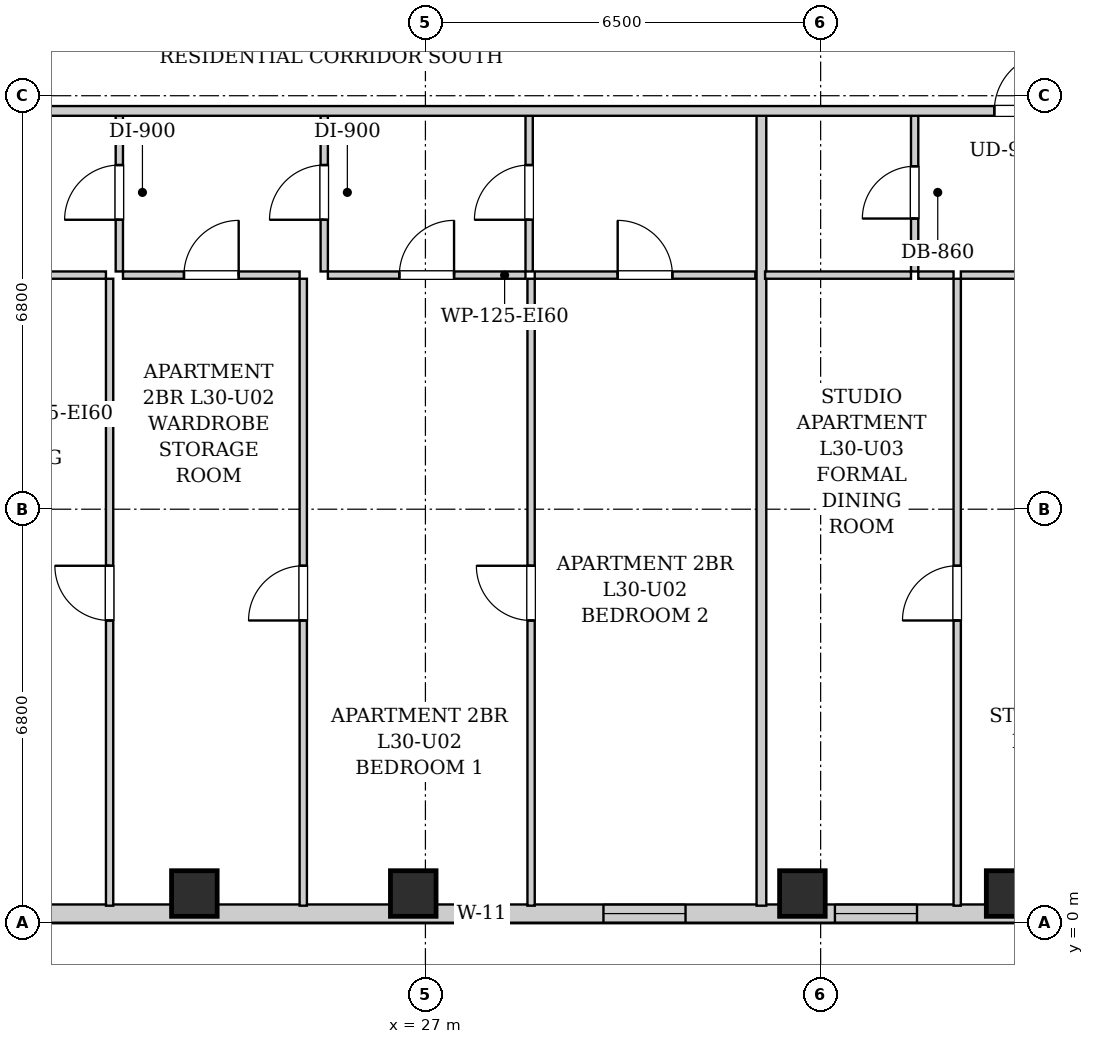
"""IFC4 building model, lengths in metres.
Left out: names, types, materials, properties, quantities, classifications, styles, units other than length and angle.
Written with IfcOpenShell. Run it as: python <this file> out.ifc"""

import sys

from ifc_helpers import new_model, si_unit, direction, frame, frame_2d, origin, origin_2d, place, context, subcontext, project, spatial, rectangle, extrude, element, fill, save


model = new_model("IFC4")
c1 = context("Model", 3, precision=1e-05, world=origin(), true_north=direction((0.0, 1.0)))
c2 = subcontext(c1, "Body", "Model", "MODEL_VIEW")
j1 = project(units=[si_unit("LENGTHUNIT", "METRE"), si_unit("PLANEANGLEUNIT", "RADIAN")], contexts=[c1])
p1 = place(None, origin())
s1 = spatial("IfcSite", under=j1, at=p1, CompositionType="ELEMENT")
p2 = place(p1, origin())
s2 = spatial("IfcBuilding", under=s1, at=p2, CompositionType="ELEMENT")
p3 = place(p2, frame((0.0, 0.0, 107.1)))
s3 = spatial("IfcBuildingStorey", under=s2, at=p3, CompositionType="ELEMENT", Elevation=107.1)
for number, where, z_axis, x_axis in (
    (1, (23.2, 0.48, 0.0), (0.0, 0.0, 1.0), (1.0, 0.0, 0.0)),
    (2, (26.8, 0.48, 0.0), (0.0, 0.0, 1.0), (1.0, 0.0, 0.0)),
    (3, (33.2, 0.48, 0.0), (0.0, 0.0, 1.0), (1.0, 0.0, 0.0)),
    (4, (36.6, 0.48, 0.0), (0.0, 0.0, 1.0), (1.0, 0.0, 0.0)),
):
    element("IfcColumn", number, at=place(p3, frame(where, z_axis=z_axis, x_axis=x_axis)), inside=s3, PredefinedType="COLUMN", context=c2, shape_type="SweptSolid", body=[
        extrude(rectangle(XDim=0.75, YDim=0.75, at=origin_2d()), origin(), (0.0, 0.0, 1.0), 3.2),
    ])
p4 = place(p3, frame((40.9, 0.15, 0.0), z_axis=(0.0, 0.0, 1.0), x_axis=(-1.0, 0.0, 0.0)))
e5 = element("IfcWall", 5, at=p4, inside=s3, PredefinedType="SOLIDWALL", context=c2, shape_type="SweptSolid", body=[
    extrude(rectangle(XDim=23.15, YDim=0.3, at=frame_2d((11.575, 0.0))), origin(), (0.0, 0.0, 1.0), 2.94),
])
p5 = place(p4, frame((20.296, 0.0, 0.55)))
e6 = element("IfcOpeningElement", 6, at=p5, cuts=e5, PredefinedType="OPENING", context=c2, shape_type="SweptSolid", body=[
    extrude(rectangle(XDim=1.35, YDim=1.2, at=frame_2d((0.675, 0.6))), frame((0.0, 0.16, 0.0), z_axis=(0.0, -1.0, 0.0), x_axis=(1.0, 0.0, 0.0)), (0.0, 0.0, 1.0), 0.32),
])
p6 = place(p4, frame((12.55, 0.0, 0.55)))
e7 = element("IfcOpeningElement", 7, at=p6, cuts=e5, PredefinedType="OPENING", context=c2, shape_type="SweptSolid", body=[
    extrude(rectangle(XDim=0.85, YDim=1.2, at=frame_2d((0.425, 0.6))), frame((0.0, 0.16, 0.0), z_axis=(0.0, -1.0, 0.0), x_axis=(1.0, 0.0, 0.0)), (0.0, 0.0, 1.0), 0.32),
])
p7 = place(p4, frame((9.622, 0.0, 0.55)))
e8 = element("IfcOpeningElement", 8, at=p7, cuts=e5, PredefinedType="OPENING", context=c2, shape_type="SweptSolid", body=[
    extrude(rectangle(XDim=1.35, YDim=1.2, at=frame_2d((0.675, 0.6))), frame((0.0, 0.16, 0.0), z_axis=(0.0, -1.0, 0.0), x_axis=(1.0, 0.0, 0.0)), (0.0, 0.0, 1.0), 0.32),
])
p8 = place(p4, frame((5.815, 0.0, 0.55)))
e9 = element("IfcOpeningElement", 9, at=p8, cuts=e5, PredefinedType="OPENING", context=c2, shape_type="SweptSolid", body=[
    extrude(rectangle(XDim=1.35, YDim=1.2, at=frame_2d((0.675, 0.6))), frame((0.0, 0.16, 0.0), z_axis=(0.0, -1.0, 0.0), x_axis=(1.0, 0.0, 0.0)), (0.0, 0.0, 1.0), 0.32),
])
p9 = place(p4, frame((2.106, 0.0, 0.55)))
e10 = element("IfcOpeningElement", 10, at=p9, cuts=e5, PredefinedType="OPENING", context=c2, shape_type="SweptSolid", body=[
    extrude(rectangle(XDim=1.35, YDim=1.2, at=frame_2d((0.675, 0.6))), frame((0.0, 0.16, 0.0), z_axis=(0.0, -1.0, 0.0), x_axis=(1.0, 0.0, 0.0)), (0.0, 0.0, 1.0), 0.32),
])
p10 = place(p3, frame((21.966, 10.71, 0.0), z_axis=(0.0, 0.0, 1.0), x_axis=(0.0, 1.0, 0.0)))
e11 = element("IfcWall", 11, at=p10, inside=s3, PredefinedType="PARTITIONING", context=c2, shape_type="SweptSolid", body=[
    extrude(rectangle(XDim=2.6, YDim=0.12, at=frame_2d((1.3, 0.0))), origin(), (0.0, 0.0, 1.0), 2.94),
])
p11 = place(p10, frame((0.85, 0.0, 0.0)))
e12 = element("IfcOpeningElement", 12, at=p11, cuts=e11, PredefinedType="OPENING", context=c2, shape_type="SweptSolid", body=[
    extrude(rectangle(XDim=0.9, YDim=2.05, at=frame_2d((0.45, 1.025))), frame((0.0, 0.07, 0.0), z_axis=(0.0, -1.0, 0.0), x_axis=(1.0, 0.0, 0.0)), (0.0, 0.0, 1.0), 0.14),
])
p12 = place(p3, frame((17.466, 10.65, 0.0), z_axis=(0.0, 0.0, 1.0), x_axis=(1.0, 0.0, 0.0)))
e13 = element("IfcWall", 13, at=p12, inside=s3, PredefinedType="PARTITIONING", context=c2, shape_type="SweptSolid", body=[
    extrude(rectangle(XDim=4.28, YDim=0.12, at=frame_2d((2.14, 0.0))), origin(), (0.0, 0.0, 1.0), 2.94),
])
p13 = place(p12, frame((1.69, 0.0, 0.0)))
e14 = element("IfcOpeningElement", 14, at=p13, cuts=e13, PredefinedType="OPENING", context=c2, shape_type="SweptSolid", body=[
    extrude(rectangle(XDim=0.9, YDim=2.05, at=frame_2d((0.45, 1.025))), frame((0.0, 0.07, 0.0), z_axis=(0.0, -1.0, 0.0), x_axis=(1.0, 0.0, 0.0)), (0.0, 0.0, 1.0), 0.14),
])
p14 = place(p3, frame((25.336, 10.71, 0.0), z_axis=(0.0, 0.0, 1.0), x_axis=(0.0, 1.0, 0.0)))
e15 = element("IfcWall", 15, at=p14, inside=s3, PredefinedType="PARTITIONING", context=c2, shape_type="SweptSolid", body=[
    extrude(rectangle(XDim=2.6, YDim=0.12, at=frame_2d((1.3, 0.0))), origin(), (0.0, 0.0, 1.0), 2.94),
])
p15 = place(p14, frame((0.85, 0.0, 0.0)))
e16 = element("IfcOpeningElement", 16, at=p15, cuts=e15, PredefinedType="OPENING", context=c2, shape_type="SweptSolid", body=[
    extrude(rectangle(XDim=0.9, YDim=2.05, at=frame_2d((0.45, 1.025))), frame((0.0, 0.07, 0.0), z_axis=(0.0, -1.0, 0.0), x_axis=(1.0, 0.0, 0.0)), (0.0, 0.0, 1.0), 0.14),
])
p16 = place(p3, frame((22.026, 10.65, 0.0), z_axis=(0.0, 0.0, 1.0), x_axis=(1.0, 0.0, 0.0)))
e17 = element("IfcWall", 17, at=p16, inside=s3, PredefinedType="PARTITIONING", context=c2, shape_type="SweptSolid", body=[
    extrude(rectangle(XDim=2.905, YDim=0.12, at=frame_2d((1.453, 0.0))), origin(), (0.0, 0.0, 1.0), 2.94),
])
p17 = place(p16, frame((1.003, 0.0, 0.0)))
e18 = element("IfcOpeningElement", 18, at=p17, cuts=e17, PredefinedType="OPENING", context=c2, shape_type="SweptSolid", body=[
    extrude(rectangle(XDim=0.9, YDim=2.05, at=frame_2d((0.45, 1.025))), frame((0.0, 0.07, 0.0), z_axis=(0.0, -1.0, 0.0), x_axis=(1.0, 0.0, 0.0)), (0.0, 0.0, 1.0), 0.14),
])
p18 = place(p3, frame((28.706, 10.71, 0.0), z_axis=(0.0, 0.0, 1.0), x_axis=(0.0, 1.0, 0.0)))
e19 = element("IfcWall", 19, at=p18, inside=s3, PredefinedType="PARTITIONING", context=c2, shape_type="SweptSolid", body=[
    extrude(rectangle(XDim=2.6, YDim=0.12, at=frame_2d((1.3, 0.0))), origin(), (0.0, 0.0, 1.0), 2.94),
])
p19 = place(p18, frame((0.85, 0.0, 0.0)))
e20 = element("IfcOpeningElement", 20, at=p19, cuts=e19, PredefinedType="OPENING", context=c2, shape_type="SweptSolid", body=[
    extrude(rectangle(XDim=0.9, YDim=2.05, at=frame_2d((0.45, 1.025))), frame((0.0, 0.07, 0.0), z_axis=(0.0, -1.0, 0.0), x_axis=(1.0, 0.0, 0.0)), (0.0, 0.0, 1.0), 0.14),
])
p20 = place(p3, frame((25.396, 10.65, 0.0), z_axis=(0.0, 0.0, 1.0), x_axis=(1.0, 0.0, 0.0)))
e21 = element("IfcWall", 21, at=p20, inside=s3, PredefinedType="PARTITIONING", context=c2, shape_type="SweptSolid", body=[
    extrude(rectangle(XDim=3.25, YDim=0.12, at=frame_2d((1.625, 0.0))), origin(), (0.0, 0.0, 1.0), 2.94),
])
p21 = place(p20, frame((1.175, 0.0, 0.0)))
e22 = element("IfcOpeningElement", 22, at=p21, cuts=e21, PredefinedType="OPENING", context=c2, shape_type="SweptSolid", body=[
    extrude(rectangle(XDim=0.9, YDim=2.05, at=frame_2d((0.45, 1.025))), frame((0.0, 0.07, 0.0), z_axis=(0.0, -1.0, 0.0), x_axis=(1.0, 0.0, 0.0)), (0.0, 0.0, 1.0), 0.14),
])
p22 = place(p3, frame((28.798, 10.65, 0.0), z_axis=(0.0, 0.0, 1.0), x_axis=(1.0, 0.0, 0.0)))
e23 = element("IfcWall", 23, at=p22, inside=s3, PredefinedType="PARTITIONING", context=c2, shape_type="SweptSolid", body=[
    extrude(rectangle(XDim=3.628, YDim=0.12, at=frame_2d((1.814, 0.0))), origin(), (0.0, 0.0, 1.0), 2.94),
])
p23 = place(p22, frame((1.364, 0.0, 0.0)))
e24 = element("IfcOpeningElement", 24, at=p23, cuts=e23, PredefinedType="OPENING", context=c2, shape_type="SweptSolid", body=[
    extrude(rectangle(XDim=0.9, YDim=2.05, at=frame_2d((0.45, 1.025))), frame((0.0, 0.07, 0.0), z_axis=(0.0, -1.0, 0.0), x_axis=(1.0, 0.0, 0.0)), (0.0, 0.0, 1.0), 0.14),
])
p24 = place(p3, frame((21.806, 0.28, 0.0), z_axis=(0.0, 0.0, 1.0), x_axis=(0.0, 1.0, 0.0)))
e25 = element("IfcWall", 25, at=p24, inside=s3, PredefinedType="PARTITIONING", context=c2, shape_type="SweptSolid", body=[
    extrude(rectangle(XDim=10.31, YDim=0.12, at=frame_2d((5.155, 0.0))), origin(), (0.0, 0.0, 1.0), 2.94),
])
p25 = place(p24, frame((4.69, 0.0, 0.0)))
e26 = element("IfcOpeningElement", 26, at=p25, cuts=e25, PredefinedType="OPENING", context=c2, shape_type="SweptSolid", body=[
    extrude(rectangle(XDim=0.9, YDim=2.05, at=frame_2d((0.45, 1.025))), frame((0.0, 0.07, 0.0), z_axis=(0.0, -1.0, 0.0), x_axis=(1.0, 0.0, 0.0)), (0.0, 0.0, 1.0), 0.14),
])
p26 = place(p3, frame((24.991, 0.28, 0.0), z_axis=(0.0, 0.0, 1.0), x_axis=(0.0, 1.0, 0.0)))
e27 = element("IfcWall", 27, at=p26, inside=s3, PredefinedType="PARTITIONING", context=c2, shape_type="SweptSolid", body=[
    extrude(rectangle(XDim=10.31, YDim=0.12, at=frame_2d((5.155, 0.0))), origin(), (0.0, 0.0, 1.0), 2.94),
])
p27 = place(p26, frame((4.69, 0.0, 0.0)))
e28 = element("IfcOpeningElement", 28, at=p27, cuts=e27, PredefinedType="OPENING", context=c2, shape_type="SweptSolid", body=[
    extrude(rectangle(XDim=0.9, YDim=2.05, at=frame_2d((0.45, 1.025))), frame((0.0, 0.07, 0.0), z_axis=(0.0, -1.0, 0.0), x_axis=(1.0, 0.0, 0.0)), (0.0, 0.0, 1.0), 0.14),
])
p28 = place(p3, frame((28.738, 0.28, 0.0), z_axis=(0.0, 0.0, 1.0), x_axis=(0.0, 1.0, 0.0)))
e29 = element("IfcWall", 29, at=p28, inside=s3, PredefinedType="PARTITIONING", context=c2, shape_type="SweptSolid", body=[
    extrude(rectangle(XDim=10.31, YDim=0.12, at=frame_2d((5.155, 0.0))), origin(), (0.0, 0.0, 1.0), 2.94),
])
p29 = place(p28, frame((4.69, 0.0, 0.0)))
e30 = element("IfcOpeningElement", 30, at=p29, cuts=e29, PredefinedType="OPENING", context=c2, shape_type="SweptSolid", body=[
    extrude(rectangle(XDim=0.9, YDim=2.05, at=frame_2d((0.45, 1.025))), frame((0.0, 0.07, 0.0), z_axis=(0.0, -1.0, 0.0), x_axis=(1.0, 0.0, 0.0)), (0.0, 0.0, 1.0), 0.14),
])
p30 = place(p3, frame((32.526, 0.28, 0.0), z_axis=(0.0, 0.0, 1.0), x_axis=(0.0, 1.0, 0.0)))
e31 = element("IfcWall", 31, at=p30, inside=s3, PredefinedType="PARTITIONING", context=c2, shape_type="SweptSolid", body=[
    extrude(rectangle(XDim=13.03, YDim=0.16, at=frame_2d((6.515, 0.0))), origin(), (0.0, 0.0, 1.0), 2.94),
])
p31 = place(p3, frame((35.046, 10.71, 0.0), z_axis=(0.0, 0.0, 1.0), x_axis=(0.0, 1.0, 0.0)))
e32 = element("IfcWall", 32, at=p31, inside=s3, PredefinedType="PARTITIONING", context=c2, shape_type="SweptSolid", body=[
    extrude(rectangle(XDim=2.6, YDim=0.12, at=frame_2d((1.3, 0.0))), origin(), (0.0, 0.0, 1.0), 2.94),
])
p32 = place(p31, frame((0.87, 0.0, 0.0)))
e33 = element("IfcOpeningElement", 33, at=p32, cuts=e32, PredefinedType="OPENING", context=c2, shape_type="SweptSolid", body=[
    extrude(rectangle(XDim=0.86, YDim=2.05, at=frame_2d((0.43, 1.025))), frame((0.0, 0.07, 0.0), z_axis=(0.0, -1.0, 0.0), x_axis=(1.0, 0.0, 0.0)), (0.0, 0.0, 1.0), 0.14),
])
p33 = place(p3, frame((32.586, 10.65, 0.0), z_axis=(0.0, 0.0, 1.0), x_axis=(1.0, 0.0, 0.0)))
e34 = element("IfcWall", 34, at=p33, inside=s3, PredefinedType="PARTITIONING", context=c2, shape_type="SweptSolid", body=[
    extrude(rectangle(XDim=2.4, YDim=0.12, at=frame_2d((1.2, 0.0))), origin(), (0.0, 0.0, 1.0), 2.94),
])
p34 = place(p3, frame((35.106, 10.65, 0.0), z_axis=(0.0, 0.0, 1.0), x_axis=(1.0, 0.0, 0.0)))
e35 = element("IfcWall", 35, at=p34, inside=s3, PredefinedType="PARTITIONING", context=c2, shape_type="SweptSolid", body=[
    extrude(rectangle(XDim=0.58, YDim=0.12, at=frame_2d((0.29, 0.0))), origin(), (0.0, 0.0, 1.0), 2.94),
])
p35 = place(p3, frame((35.806, 10.65, 0.0), z_axis=(0.0, 0.0, 1.0), x_axis=(1.0, 0.0, 0.0)))
e36 = element("IfcWall", 36, at=p35, inside=s3, PredefinedType="PARTITIONING", context=c2, shape_type="SweptSolid", body=[
    extrude(rectangle(XDim=2.75, YDim=0.12, at=frame_2d((1.375, 0.0))), origin(), (0.0, 0.0, 1.0), 2.94),
])
p36 = place(p35, frame((0.925, 0.0, 0.0)))
e37 = element("IfcOpeningElement", 37, at=p36, cuts=e36, PredefinedType="OPENING", context=c2, shape_type="SweptSolid", body=[
    extrude(rectangle(XDim=0.9, YDim=2.05, at=frame_2d((0.45, 1.025))), frame((0.0, 0.07, 0.0), z_axis=(0.0, -1.0, 0.0), x_axis=(1.0, 0.0, 0.0)), (0.0, 0.0, 1.0), 0.14),
])
p37 = place(p3, frame((35.746, 0.28, 0.0), z_axis=(0.0, 0.0, 1.0), x_axis=(0.0, 1.0, 0.0)))
e38 = element("IfcWall", 38, at=p37, inside=s3, PredefinedType="PARTITIONING", context=c2, shape_type="SweptSolid", body=[
    extrude(rectangle(XDim=10.31, YDim=0.12, at=frame_2d((5.155, 0.0))), origin(), (0.0, 0.0, 1.0), 2.94),
])
p38 = place(p37, frame((4.69, 0.0, 0.0)))
e39 = element("IfcOpeningElement", 39, at=p38, cuts=e38, PredefinedType="OPENING", context=c2, shape_type="SweptSolid", body=[
    extrude(rectangle(XDim=0.9, YDim=2.05, at=frame_2d((0.45, 1.025))), frame((0.0, 0.07, 0.0), z_axis=(0.0, -1.0, 0.0), x_axis=(1.0, 0.0, 0.0)), (0.0, 0.0, 1.0), 0.14),
])
p39 = place(p3, frame((10.05, 13.35, 0.0), z_axis=(0.0, 0.0, 1.0), x_axis=(1.0, 0.0, 0.0)))
e40 = element("IfcWall", 40, at=p39, inside=s3, PredefinedType="PARTITIONING", context=c2, shape_type="SweptSolid", body=[
    extrude(rectangle(XDim=30.8, YDim=0.16, at=frame_2d((15.4, 0.0))), origin(), (0.0, 0.0, 1.0), 2.94),
])
p40 = place(p39, frame((2.893, 0.0, 0.0)))
e41 = element("IfcOpeningElement", 41, at=p40, cuts=e40, PredefinedType="OPENING", context=c2, shape_type="SweptSolid", body=[
    extrude(rectangle(XDim=0.95, YDim=2.1, at=frame_2d((0.475, 1.05))), frame((0.0, 0.09, 0.0), z_axis=(0.0, -1.0, 0.0), x_axis=(1.0, 0.0, 0.0)), (0.0, 0.0, 1.0), 0.18),
])
p41 = place(p39, frame((9.161, 0.0, 0.0)))
e42 = element("IfcOpeningElement", 42, at=p41, cuts=e40, PredefinedType="OPENING", context=c2, shape_type="SweptSolid", body=[
    extrude(rectangle(XDim=0.95, YDim=2.1, at=frame_2d((0.475, 1.05))), frame((0.0, 0.09, 0.0), z_axis=(0.0, -1.0, 0.0), x_axis=(1.0, 0.0, 0.0)), (0.0, 0.0, 1.0), 0.18),
])
p42 = place(p39, frame((26.306, 0.0, 0.0)))
e43 = element("IfcOpeningElement", 43, at=p42, cuts=e40, PredefinedType="OPENING", context=c2, shape_type="SweptSolid", body=[
    extrude(rectangle(XDim=0.95, YDim=2.1, at=frame_2d((0.475, 1.05))), frame((0.0, 0.09, 0.0), z_axis=(0.0, -1.0, 0.0), x_axis=(1.0, 0.0, 0.0)), (0.0, 0.0, 1.0), 0.18),
])
p43 = place(p11, origin())
e44 = element("IfcDoor", 44, at=p43, inside=s3, OperationType="SINGLE_SWING_LEFT", PredefinedType="DOOR", context=c2, shape_type="SweptSolid", body=[
    extrude(rectangle(XDim=0.9, YDim=2.05, at=frame_2d((0.45, 1.025))), frame((0.0, 0.025, 0.0), z_axis=(0.0, -1.0, 0.0), x_axis=(1.0, 0.0, 0.0)), (0.0, 0.0, 1.0), 0.05),
])
fill(e12, e44)
p44 = place(p15, origin())
e45 = element("IfcDoor", 45, at=p44, inside=s3, OperationType="SINGLE_SWING_LEFT", PredefinedType="DOOR", context=c2, shape_type="SweptSolid", body=[
    extrude(rectangle(XDim=0.9, YDim=2.05, at=frame_2d((0.45, 1.025))), frame((0.0, 0.025, 0.0), z_axis=(0.0, -1.0, 0.0), x_axis=(1.0, 0.0, 0.0)), (0.0, 0.0, 1.0), 0.05),
])
fill(e16, e45)
p45 = place(p17, origin())
e46 = element("IfcDoor", 46, at=p45, inside=s3, OperationType="SINGLE_SWING_RIGHT", PredefinedType="DOOR", context=c2, shape_type="SweptSolid", body=[
    extrude(rectangle(XDim=0.9, YDim=2.05, at=frame_2d((0.45, 1.025))), frame((0.0, 0.025, 0.0), z_axis=(0.0, -1.0, 0.0), x_axis=(1.0, 0.0, 0.0)), (0.0, 0.0, 1.0), 0.05),
])
fill(e18, e46)
p46 = place(p19, origin())
e47 = element("IfcDoor", 47, at=p46, inside=s3, OperationType="SINGLE_SWING_LEFT", PredefinedType="DOOR", context=c2, shape_type="SweptSolid", body=[
    extrude(rectangle(XDim=0.9, YDim=2.05, at=frame_2d((0.45, 1.025))), frame((0.0, 0.025, 0.0), z_axis=(0.0, -1.0, 0.0), x_axis=(1.0, 0.0, 0.0)), (0.0, 0.0, 1.0), 0.05),
])
fill(e20, e47)
p47 = place(p21, origin())
e48 = element("IfcDoor", 48, at=p47, inside=s3, OperationType="SINGLE_SWING_RIGHT", PredefinedType="DOOR", context=c2, shape_type="SweptSolid", body=[
    extrude(rectangle(XDim=0.9, YDim=2.05, at=frame_2d((0.45, 1.025))), frame((0.0, 0.025, 0.0), z_axis=(0.0, -1.0, 0.0), x_axis=(1.0, 0.0, 0.0)), (0.0, 0.0, 1.0), 0.05),
])
fill(e22, e48)
p48 = place(p23, origin())
e49 = element("IfcDoor", 49, at=p48, inside=s3, OperationType="SINGLE_SWING_LEFT", PredefinedType="DOOR", context=c2, shape_type="SweptSolid", body=[
    extrude(rectangle(XDim=0.9, YDim=2.05, at=frame_2d((0.45, 1.025))), frame((0.0, 0.025, 0.0), z_axis=(0.0, -1.0, 0.0), x_axis=(1.0, 0.0, 0.0)), (0.0, 0.0, 1.0), 0.05),
])
fill(e24, e49)
p49 = place(p25, origin())
e50 = element("IfcDoor", 50, at=p49, inside=s3, OperationType="SINGLE_SWING_RIGHT", PredefinedType="DOOR", context=c2, shape_type="SweptSolid", body=[
    extrude(rectangle(XDim=0.9, YDim=2.05, at=frame_2d((0.45, 1.025))), frame((0.0, 0.025, 0.0), z_axis=(0.0, -1.0, 0.0), x_axis=(1.0, 0.0, 0.0)), (0.0, 0.0, 1.0), 0.05),
])
fill(e26, e50)
p50 = place(p27, origin())
e51 = element("IfcDoor", 51, at=p50, inside=s3, OperationType="SINGLE_SWING_LEFT", PredefinedType="DOOR", context=c2, shape_type="SweptSolid", body=[
    extrude(rectangle(XDim=0.9, YDim=2.05, at=frame_2d((0.45, 1.025))), frame((0.0, 0.025, 0.0), z_axis=(0.0, -1.0, 0.0), x_axis=(1.0, 0.0, 0.0)), (0.0, 0.0, 1.0), 0.05),
])
fill(e28, e51)
p51 = place(p29, origin())
e52 = element("IfcDoor", 52, at=p51, inside=s3, OperationType="SINGLE_SWING_RIGHT", PredefinedType="DOOR", context=c2, shape_type="SweptSolid", body=[
    extrude(rectangle(XDim=0.9, YDim=2.05, at=frame_2d((0.45, 1.025))), frame((0.0, 0.025, 0.0), z_axis=(0.0, -1.0, 0.0), x_axis=(1.0, 0.0, 0.0)), (0.0, 0.0, 1.0), 0.05),
])
fill(e30, e52)
p52 = place(p32, origin())
e53 = element("IfcDoor", 53, at=p52, inside=s3, OperationType="SINGLE_SWING_LEFT", PredefinedType="DOOR", context=c2, shape_type="SweptSolid", body=[
    extrude(rectangle(XDim=0.86, YDim=2.05, at=frame_2d((0.43, 1.025))), frame((0.0, 0.025, 0.0), z_axis=(0.0, -1.0, 0.0), x_axis=(1.0, 0.0, 0.0)), (0.0, 0.0, 1.0), 0.05),
])
fill(e33, e53)
p53 = place(p38, origin())
e54 = element("IfcDoor", 54, at=p53, inside=s3, OperationType="SINGLE_SWING_LEFT", PredefinedType="DOOR", context=c2, shape_type="SweptSolid", body=[
    extrude(rectangle(XDim=0.9, YDim=2.05, at=frame_2d((0.45, 1.025))), frame((0.0, 0.025, 0.0), z_axis=(0.0, -1.0, 0.0), x_axis=(1.0, 0.0, 0.0)), (0.0, 0.0, 1.0), 0.05),
])
fill(e39, e54)
p54 = place(p42, origin())
e55 = element("IfcDoor", 55, at=p54, inside=s3, OperationType="SINGLE_SWING_RIGHT", PredefinedType="DOOR", context=c2, shape_type="SweptSolid", body=[
    extrude(rectangle(XDim=0.95, YDim=2.1, at=frame_2d((0.475, 1.05))), frame((0.0, 0.025, 0.0), z_axis=(0.0, -1.0, 0.0), x_axis=(1.0, 0.0, 0.0)), (0.0, 0.0, 1.0), 0.05),
])
fill(e43, e55)
p55 = place(p6, origin())
e56 = element("IfcWindow", 56, at=p55, inside=s3, PartitioningType="SINGLE_PANEL", PredefinedType="WINDOW", context=c2, shape_type="SweptSolid", body=[
    extrude(rectangle(XDim=0.85, YDim=1.2, at=frame_2d((0.425, 0.6))), frame((0.0, 0.03, 0.0), z_axis=(0.0, -1.0, 0.0), x_axis=(1.0, 0.0, 0.0)), (0.0, 0.0, 1.0), 0.06),
])
fill(e7, e56)
p56 = place(p7, origin())
e57 = element("IfcWindow", 57, at=p56, inside=s3, PartitioningType="SINGLE_PANEL", PredefinedType="WINDOW", context=c2, shape_type="SweptSolid", body=[
    extrude(rectangle(XDim=1.35, YDim=1.2, at=frame_2d((0.675, 0.6))), frame((0.0, 0.03, 0.0), z_axis=(0.0, -1.0, 0.0), x_axis=(1.0, 0.0, 0.0)), (0.0, 0.0, 1.0), 0.06),
])
fill(e8, e57)
p57 = place(p8, origin())
e58 = element("IfcWindow", 58, at=p57, inside=s3, PartitioningType="SINGLE_PANEL", PredefinedType="WINDOW", context=c2, shape_type="SweptSolid", body=[
    extrude(rectangle(XDim=1.35, YDim=1.2, at=frame_2d((0.675, 0.6))), frame((0.0, 0.03, 0.0), z_axis=(0.0, -1.0, 0.0), x_axis=(1.0, 0.0, 0.0)), (0.0, 0.0, 1.0), 0.06),
])
fill(e9, e58)
save(model, sys.argv[1])
